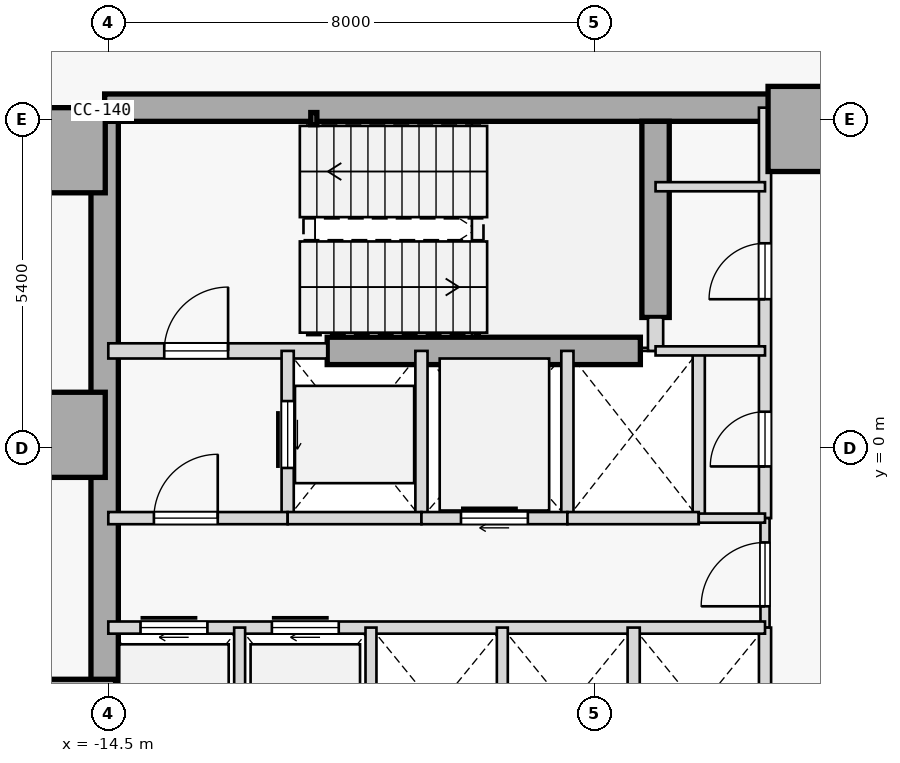
"""IFC4 building model, lengths in metres.
Left out: names, types, materials, properties, quantities, classifications, styles, units other than length and angle.
Written with IfcOpenShell. Run it as: python <this file> out.ifc"""

import sys

from ifc_helpers import new_model, si_unit, direction, frame, frame_2d, origin, origin_2d, place, context, subcontext, project, spatial, rectangle, hollow_rectangle, extrude, element, fill, save


model = new_model("IFC4")
c1 = context("Model", 3, precision=1e-05, world=origin(), true_north=direction((0.0, 1.0)))
c2 = subcontext(c1, "Body", "Model", "MODEL_VIEW")
j1 = project(units=[si_unit("LENGTHUNIT", "METRE"), si_unit("PLANEANGLEUNIT", "RADIAN")], contexts=[c1])
p1 = place(None, origin())
s1 = spatial("IfcSite", under=j1, at=p1, CompositionType="ELEMENT")
p2 = place(p1, origin())
s2 = spatial("IfcBuilding", under=s1, at=p2, CompositionType="ELEMENT")
p3 = place(p2, frame((0.0, 0.0, 29.4)))
s3 = spatial("IfcBuildingStorey", under=s2, at=p3, CompositionType="ELEMENT", Elevation=29.4)
for number, where, z_axis, x_axis in (
    (1, (-15.25, 4.9, 0.0), (0.0, 0.0, 1.0), (1.0, 0.0, 0.0)),
    (2, (-15.25, 0.22, 0.0), (0.0, 0.0, 1.0), (1.0, 0.0, 0.0)),
    (3, (-15.08, -4.5, 0.0), (0.0, 0.0, 1.0), (1.0, 0.0, 0.0)),
    (4, (-2.95, 5.25, 0.0), (0.0, 0.0, 1.0), (1.0, 0.0, 0.0)),
):
    element("IfcColumn", number, at=place(p3, frame(where, z_axis=z_axis, x_axis=x_axis)), inside=s3, PredefinedType="COLUMN", context=c2, shape_type="SweptSolid", body=[
        extrude(rectangle(XDim=1.4, YDim=1.4, at=origin_2d()), origin(), (0.0, 0.0, 1.0), 3.8),
    ])
p4 = place(p3, frame((-14.56, 5.6, 0.0), z_axis=(0.0, 0.0, 1.0), x_axis=(1.0, 0.0, 0.0)))
e5 = element("IfcWall", 5, at=p4, inside=s3, PredefinedType="SHEAR", context=c2, shape_type="SweptSolid", body=[
    extrude(rectangle(XDim=11.41, YDim=0.45, at=frame_2d((5.705, 0.0))), origin(), (0.0, 0.0, 1.0), 3.575),
])
p5 = place(p3, frame((-14.56, -5.375, 0.0), z_axis=(0.0, 0.0, 1.0), x_axis=(0.0, 1.0, 0.0)))
e6 = element("IfcWall", 6, at=p5, inside=s3, PredefinedType="SHEAR", context=c2, shape_type="SweptSolid", body=[
    extrude(rectangle(XDim=10.75, YDim=0.45, at=frame_2d((5.375, 0.0))), origin(), (0.0, 0.0, 1.0), 3.575),
])
p6 = place(p3, frame((-5.5, 2.15, 0.0), z_axis=(0.0, 0.0, 1.0), x_axis=(0.0, 1.0, 0.0)))
e7 = element("IfcWall", 7, at=p6, inside=s3, PredefinedType="SHEAR", context=c2, shape_type="SweptSolid", body=[
    extrude(rectangle(XDim=3.225, YDim=0.45, at=frame_2d((1.613, 0.0))), origin(), (0.0, 0.0, 1.0), 3.575),
])
p7 = place(p3, frame((-10.9, 1.6, 0.0), z_axis=(0.0, 0.0, 1.0), x_axis=(1.0, 0.0, 0.0)))
e8 = element("IfcWall", 8, at=p7, inside=s3, PredefinedType="SHEAR", context=c2, shape_type="SweptSolid", body=[
    extrude(rectangle(XDim=5.15, YDim=0.45, at=frame_2d((2.575, 0.0))), origin(), (0.0, 0.0, 1.0), 3.575),
])
p8 = place(p3, frame((-11.12, 5.42, 0.0), z_axis=(0.0, 0.0, 1.0), x_axis=(1.0, 0.0, 0.0)))
e9 = element("IfcColumn", 9, at=p8, inside=s3, PredefinedType="COLUMN", context=c2, shape_type="SweptSolid", body=[
    extrude(hollow_rectangle(XDim=0.1, YDim=0.2, WallThickness=0.008, at=origin_2d()), origin(), (0.0, 0.0, 1.0), 3.8),
])
p9 = place(p3, frame((-14.5, 1.6, 0.0), z_axis=(0.0, 0.0, 1.0), x_axis=(1.0, 0.0, 0.0)))
e10 = element("IfcWall", 10, at=p9, inside=s3, PredefinedType="STANDARD", context=c2, shape_type="SweptSolid", body=[
    extrude(rectangle(XDim=3.6, YDim=0.25, at=frame_2d((1.8, 0.0))), origin(), (0.0, 0.0, 1.0), 3.575),
])
p10 = place(p9, frame((0.92, 0.0, 0.0)))
e11 = element("IfcOpeningElement", 11, at=p10, cuts=e10, PredefinedType="OPENING", context=c2, shape_type="SweptSolid", body=[
    extrude(rectangle(XDim=1.05, YDim=2.15, at=frame_2d((0.525, 1.075))), frame((0.0, 0.135, 0.0), z_axis=(0.0, -1.0, 0.0), x_axis=(1.0, 0.0, 0.0)), (0.0, 0.0, 1.0), 0.27),
])
p11 = place(p3, frame((-5.5, 1.6, 0.0), z_axis=(0.0, 0.0, 1.0), x_axis=(0.0, 1.0, 0.0)))
e12 = element("IfcWall", 12, at=p11, inside=s3, PredefinedType="STANDARD", context=c2, shape_type="SweptSolid", body=[
    extrude(rectangle(XDim=0.55, YDim=0.25, at=frame_2d((0.275, 0.0))), origin(), (0.0, 0.0, 1.0), 3.575),
])
p12 = place(p3, frame((-3.7, -1.15, 0.0), z_axis=(0.0, 0.0, 1.0), x_axis=(0.0, 1.0, 0.0)))
e13 = element("IfcWall", 13, at=p12, inside=s3, PredefinedType="STANDARD", context=c2, shape_type="SweptSolid", body=[
    extrude(rectangle(XDim=6.75, YDim=0.2, at=frame_2d((3.375, 0.0))), origin(), (0.0, 0.0, 1.0), 3.575),
])
p13 = place(p12, frame((3.6, 0.0, 0.0)))
e14 = element("IfcOpeningElement", 14, at=p13, cuts=e13, PredefinedType="OPENING", context=c2, shape_type="SweptSolid", body=[
    extrude(rectangle(XDim=0.92, YDim=2.15, at=frame_2d((0.46, 1.075))), frame((0.0, 0.11, 0.0), z_axis=(0.0, -1.0, 0.0), x_axis=(1.0, 0.0, 0.0)), (0.0, 0.0, 1.0), 0.22),
])
p14 = place(p12, frame((0.85, 0.0, 0.0)))
e15 = element("IfcOpeningElement", 15, at=p14, cuts=e13, PredefinedType="OPENING", context=c2, shape_type="SweptSolid", body=[
    extrude(rectangle(XDim=0.9, YDim=2.15, at=frame_2d((0.45, 1.075))), frame((0.0, 0.11, 0.0), z_axis=(0.0, -1.0, 0.0), x_axis=(1.0, 0.0, 0.0)), (0.0, 0.0, 1.0), 0.22),
])
p15 = place(p3, frame((-3.7, -2.95, 0.0), z_axis=(0.0, 0.0, 1.0), x_axis=(0.0, 1.0, 0.0)))
e16 = element("IfcWall", 16, at=p15, inside=s3, PredefinedType="PARTITIONING", context=c2, shape_type="SweptSolid", body=[
    extrude(rectangle(XDim=1.8, YDim=0.15, at=frame_2d((0.9, 0.0))), origin(), (0.0, 0.0, 1.0), 3.575),
])
p16 = place(p15, frame((0.35, 0.0, 0.0)))
e17 = element("IfcOpeningElement", 17, at=p16, cuts=e16, PredefinedType="OPENING", context=c2, shape_type="SweptSolid", body=[
    extrude(rectangle(XDim=1.05, YDim=2.18, at=frame_2d((0.525, 1.09))), frame((0.0, 0.085, 0.0), z_axis=(0.0, -1.0, 0.0), x_axis=(1.0, 0.0, 0.0)), (0.0, 0.0, 1.0), 0.17),
])
p17 = place(p3, frame((-3.7, -5.6, 0.0), z_axis=(0.0, 0.0, 1.0), x_axis=(0.0, 1.0, 0.0)))
e18 = element("IfcWall", 18, at=p17, inside=s3, PredefinedType="STANDARD", context=c2, shape_type="SweptSolid", body=[
    extrude(rectangle(XDim=2.65, YDim=0.2, at=frame_2d((1.325, 0.0))), origin(), (0.0, 0.0, 1.0), 3.575),
])
p18 = place(p3, frame((-11.55, -1.15, 0.0), z_axis=(0.0, 0.0, 1.0), x_axis=(0.0, 1.0, 0.0)))
e19 = element("IfcWall", 19, at=p18, inside=s3, PredefinedType="STANDARD", context=c2, shape_type="SweptSolid", body=[
    extrude(rectangle(XDim=2.75, YDim=0.2, at=frame_2d((1.375, 0.0))), origin(), (0.0, 0.0, 1.0), 3.575),
])
p19 = place(p18, frame((0.825, 0.0, 0.0)))
e20 = element("IfcOpeningElement", 20, at=p19, cuts=e19, PredefinedType="OPENING", context=c2, shape_type="SweptSolid", body=[
    extrude(rectangle(XDim=1.1, YDim=2.15, at=frame_2d((0.55, 1.075))), frame((0.0, 0.11, 0.0), z_axis=(0.0, -1.0, 0.0), x_axis=(1.0, 0.0, 0.0)), (0.0, 0.0, 1.0), 0.22),
])
p20 = place(p3, frame((-9.35, -1.15, 0.0), z_axis=(0.0, 0.0, 1.0), x_axis=(0.0, 1.0, 0.0)))
e21 = element("IfcWall", 21, at=p20, inside=s3, PredefinedType="STANDARD", context=c2, shape_type="SweptSolid", body=[
    extrude(rectangle(XDim=2.75, YDim=0.2, at=frame_2d((1.375, 0.0))), origin(), (0.0, 0.0, 1.0), 3.575),
])
p21 = place(p3, frame((-14.5, -1.15, 0.0), z_axis=(0.0, 0.0, 1.0), x_axis=(1.0, 0.0, 0.0)))
e22 = element("IfcWall", 22, at=p21, inside=s3, PredefinedType="STANDARD", context=c2, shape_type="SweptSolid", body=[
    extrude(rectangle(XDim=2.95, YDim=0.2, at=frame_2d((1.475, 0.0))), origin(), (0.0, 0.0, 1.0), 3.575),
])
p22 = place(p21, frame((0.75, 0.0, 0.0)))
e23 = element("IfcOpeningElement", 23, at=p22, cuts=e22, PredefinedType="OPENING", context=c2, shape_type="SweptSolid", body=[
    extrude(rectangle(XDim=1.05, YDim=2.18, at=frame_2d((0.525, 1.09))), frame((0.0, 0.11, 0.0), z_axis=(0.0, -1.0, 0.0), x_axis=(1.0, 0.0, 0.0)), (0.0, 0.0, 1.0), 0.22),
])
p23 = place(p3, frame((-11.55, -1.15, 0.0), z_axis=(0.0, 0.0, 1.0), x_axis=(1.0, 0.0, 0.0)))
e24 = element("IfcWall", 24, at=p23, inside=s3, PredefinedType="STANDARD", context=c2, shape_type="SweptSolid", body=[
    extrude(rectangle(XDim=2.2, YDim=0.2, at=frame_2d((1.1, 0.0))), origin(), (0.0, 0.0, 1.0), 3.575),
])
p24 = place(p3, frame((-6.95, -1.15, 0.0), z_axis=(0.0, 0.0, 1.0), x_axis=(0.0, 1.0, 0.0)))
e25 = element("IfcWall", 25, at=p24, inside=s3, PredefinedType="STANDARD", context=c2, shape_type="SweptSolid", body=[
    extrude(rectangle(XDim=2.75, YDim=0.2, at=frame_2d((1.375, 0.0))), origin(), (0.0, 0.0, 1.0), 3.575),
])
p25 = place(p3, frame((-9.35, -1.15, 0.0), z_axis=(0.0, 0.0, 1.0), x_axis=(1.0, 0.0, 0.0)))
e26 = element("IfcWall", 26, at=p25, inside=s3, PredefinedType="STANDARD", context=c2, shape_type="SweptSolid", body=[
    extrude(rectangle(XDim=2.4, YDim=0.2, at=frame_2d((1.2, 0.0))), origin(), (0.0, 0.0, 1.0), 3.575),
])
p26 = place(p25, frame((0.65, 0.0, 0.0)))
e27 = element("IfcOpeningElement", 27, at=p26, cuts=e26, PredefinedType="OPENING", context=c2, shape_type="SweptSolid", body=[
    extrude(rectangle(XDim=1.1, YDim=2.15, at=frame_2d((0.55, 1.075))), frame((0.0, 0.11, 0.0), z_axis=(0.0, -1.0, 0.0), x_axis=(1.0, 0.0, 0.0)), (0.0, 0.0, 1.0), 0.22),
])
p27 = place(p3, frame((-4.79, -1.15, 0.0), z_axis=(0.0, 0.0, 1.0), x_axis=(0.0, 1.0, 0.0)))
e28 = element("IfcWall", 28, at=p27, inside=s3, PredefinedType="STANDARD", context=c2, shape_type="SweptSolid", body=[
    extrude(rectangle(XDim=2.75, YDim=0.2, at=frame_2d((1.375, 0.0))), origin(), (0.0, 0.0, 1.0), 3.575),
])
p28 = place(p3, frame((-6.95, -1.15, 0.0), z_axis=(0.0, 0.0, 1.0), x_axis=(1.0, 0.0, 0.0)))
e29 = element("IfcWall", 29, at=p28, inside=s3, PredefinedType="STANDARD", context=c2, shape_type="SweptSolid", body=[
    extrude(rectangle(XDim=2.16, YDim=0.2, at=frame_2d((1.08, 0.0))), origin(), (0.0, 0.0, 1.0), 3.575),
])
p29 = place(p3, frame((-4.79, -1.15, 0.0), z_axis=(0.0, 0.0, 1.0), x_axis=(1.0, 0.0, 0.0)))
e30 = element("IfcWall", 30, at=p29, inside=s3, PredefinedType="PARTITIONING", context=c2, shape_type="SweptSolid", body=[
    extrude(rectangle(XDim=1.09, YDim=0.15, at=frame_2d((0.545, 0.0))), origin(), (0.0, 0.0, 1.0), 3.575),
])
p30 = place(p3, frame((-14.5, -2.95, 0.0), z_axis=(0.0, 0.0, 1.0), x_axis=(1.0, 0.0, 0.0)))
e31 = element("IfcWall", 31, at=p30, inside=s3, PredefinedType="STANDARD", context=c2, shape_type="SweptSolid", body=[
    extrude(rectangle(XDim=10.8, YDim=0.2, at=frame_2d((5.4, 0.0))), origin(), (0.0, 0.0, 1.0), 3.575),
])
p31 = place(p30, frame((0.53, 0.0, 0.0)))
e32 = element("IfcOpeningElement", 32, at=p31, cuts=e31, PredefinedType="OPENING", context=c2, shape_type="SweptSolid", body=[
    extrude(rectangle(XDim=1.1, YDim=2.15, at=frame_2d((0.55, 1.075))), frame((0.0, 0.11, 0.0), z_axis=(0.0, -1.0, 0.0), x_axis=(1.0, 0.0, 0.0)), (0.0, 0.0, 1.0), 0.22),
])
p32 = place(p30, frame((2.69, 0.0, 0.0)))
e33 = element("IfcOpeningElement", 33, at=p32, cuts=e31, PredefinedType="OPENING", context=c2, shape_type="SweptSolid", body=[
    extrude(rectangle(XDim=1.1, YDim=2.15, at=frame_2d((0.55, 1.075))), frame((0.0, 0.11, 0.0), z_axis=(0.0, -1.0, 0.0), x_axis=(1.0, 0.0, 0.0)), (0.0, 0.0, 1.0), 0.22),
])
p33 = place(p3, frame((-5.86, -5.6, 0.0), z_axis=(0.0, 0.0, 1.0), x_axis=(0.0, 1.0, 0.0)))
e34 = element("IfcWall", 34, at=p33, inside=s3, PredefinedType="STANDARD", context=c2, shape_type="SweptSolid", body=[
    extrude(rectangle(XDim=2.65, YDim=0.2, at=frame_2d((1.325, 0.0))), origin(), (0.0, 0.0, 1.0), 3.575),
])
for number, where, z_axis, x_axis in (
    (35, (-12.34, -5.6, 0.0), (0.0, 0.0, 1.0), (0.0, 1.0, 0.0)),
    (36, (-10.18, -5.6, 0.0), (0.0, 0.0, 1.0), (0.0, 1.0, 0.0)),
    (37, (-8.02, -5.6, 0.0), (0.0, 0.0, 1.0), (0.0, 1.0, 0.0)),
):
    element("IfcWall", number, at=place(p3, frame(where, z_axis=z_axis, x_axis=x_axis)), inside=s3, PredefinedType="STANDARD", context=c2, shape_type="SweptSolid", body=[
        extrude(rectangle(XDim=2.65, YDim=0.18, at=frame_2d((1.325, 0.0))), origin(), (0.0, 0.0, 1.0), 3.575),
    ])
for number, where, z_axis, x_axis in (
    (38, (-5.5, 4.3, 0.0), (0.0, 0.0, 1.0), (1.0, 0.0, 0.0)),
    (39, (-5.5, 1.6, 0.0), (0.0, 0.0, 1.0), (1.0, 0.0, 0.0)),
):
    element("IfcWall", number, at=place(p3, frame(where, z_axis=z_axis, x_axis=x_axis)), inside=s3, PredefinedType="PARTITIONING", context=c2, shape_type="SweptSolid", body=[
        extrude(rectangle(XDim=1.8, YDim=0.15, at=frame_2d((0.9, 0.0))), origin(), (0.0, 0.0, 1.0), 3.575),
    ])
p34 = place(p10, origin())
e40 = element("IfcDoor", 40, at=p34, inside=s3, OperationType="SINGLE_SWING_RIGHT", PredefinedType="DOOR", context=c2, shape_type="SweptSolid", body=[
    extrude(rectangle(XDim=1.05, YDim=2.15, at=frame_2d((0.525, 1.075))), frame((0.0, 0.025, 0.0), z_axis=(0.0, -1.0, 0.0), x_axis=(1.0, 0.0, 0.0)), (0.0, 0.0, 1.0), 0.05),
])
fill(e11, e40)
p35 = place(p22, origin())
e41 = element("IfcDoor", 41, at=p35, inside=s3, OperationType="SINGLE_SWING_RIGHT", PredefinedType="DOOR", context=c2, shape_type="SweptSolid", body=[
    extrude(rectangle(XDim=1.05, YDim=2.18, at=frame_2d((0.525, 1.09))), frame((0.0, 0.025, 0.0), z_axis=(0.0, -1.0, 0.0), x_axis=(1.0, 0.0, 0.0)), (0.0, 0.0, 1.0), 0.05),
])
fill(e23, e41)
p36 = place(p16, origin())
e42 = element("IfcDoor", 42, at=p36, inside=s3, OperationType="SINGLE_SWING_LEFT", PredefinedType="DOOR", context=c2, shape_type="SweptSolid", body=[
    extrude(rectangle(XDim=1.05, YDim=2.18, at=frame_2d((0.525, 1.09))), frame((0.0, 0.025, 0.0), z_axis=(0.0, -1.0, 0.0), x_axis=(1.0, 0.0, 0.0)), (0.0, 0.0, 1.0), 0.05),
])
fill(e17, e42)
p37 = place(p19, origin())
e43 = element("IfcDoor", 43, at=p37, inside=s3, OperationType="SLIDING_TO_RIGHT", PredefinedType="DOOR", context=c2, shape_type="SweptSolid", body=[
    extrude(rectangle(XDim=1.1, YDim=2.15, at=frame_2d((0.55, 1.075))), frame((0.0, 0.025, 0.0), z_axis=(0.0, -1.0, 0.0), x_axis=(1.0, 0.0, 0.0)), (0.0, 0.0, 1.0), 0.05),
])
fill(e20, e43)
p38 = place(p26, origin())
e44 = element("IfcDoor", 44, at=p38, inside=s3, OperationType="SLIDING_TO_RIGHT", PredefinedType="DOOR", context=c2, shape_type="SweptSolid", body=[
    extrude(rectangle(XDim=1.1, YDim=2.15, at=frame_2d((0.55, 1.075))), frame((0.0, 0.025, 0.0), z_axis=(0.0, -1.0, 0.0), x_axis=(1.0, 0.0, 0.0)), (0.0, 0.0, 1.0), 0.05),
])
fill(e27, e44)
p39 = place(p31, origin())
e45 = element("IfcDoor", 45, at=p39, inside=s3, OperationType="SLIDING_TO_RIGHT", PredefinedType="DOOR", context=c2, shape_type="SweptSolid", body=[
    extrude(rectangle(XDim=1.1, YDim=2.15, at=frame_2d((0.55, 1.075))), frame((0.0, 0.025, 0.0), z_axis=(0.0, -1.0, 0.0), x_axis=(1.0, 0.0, 0.0)), (0.0, 0.0, 1.0), 0.05),
])
fill(e32, e45)
p40 = place(p32, origin())
e46 = element("IfcDoor", 46, at=p40, inside=s3, OperationType="SLIDING_TO_RIGHT", PredefinedType="DOOR", context=c2, shape_type="SweptSolid", body=[
    extrude(rectangle(XDim=1.1, YDim=2.15, at=frame_2d((0.55, 1.075))), frame((0.0, 0.025, 0.0), z_axis=(0.0, -1.0, 0.0), x_axis=(1.0, 0.0, 0.0)), (0.0, 0.0, 1.0), 0.05),
])
fill(e33, e46)
p41 = place(p13, origin())
e47 = element("IfcDoor", 47, at=p41, inside=s3, OperationType="SINGLE_SWING_LEFT", PredefinedType="DOOR", context=c2, shape_type="SweptSolid", body=[
    extrude(rectangle(XDim=0.92, YDim=2.15, at=frame_2d((0.46, 1.075))), frame((0.0, 0.025, 0.0), z_axis=(0.0, -1.0, 0.0), x_axis=(1.0, 0.0, 0.0)), (0.0, 0.0, 1.0), 0.05),
])
fill(e14, e47)
p42 = place(p14, origin())
e48 = element("IfcDoor", 48, at=p42, inside=s3, OperationType="SINGLE_SWING_LEFT", PredefinedType="DOOR", context=c2, shape_type="SweptSolid", body=[
    extrude(rectangle(XDim=0.9, YDim=2.15, at=frame_2d((0.45, 1.075))), frame((0.0, 0.025, 0.0), z_axis=(0.0, -1.0, 0.0), x_axis=(1.0, 0.0, 0.0)), (0.0, 0.0, 1.0), 0.05),
])
fill(e15, e48)
save(model, sys.argv[1])
